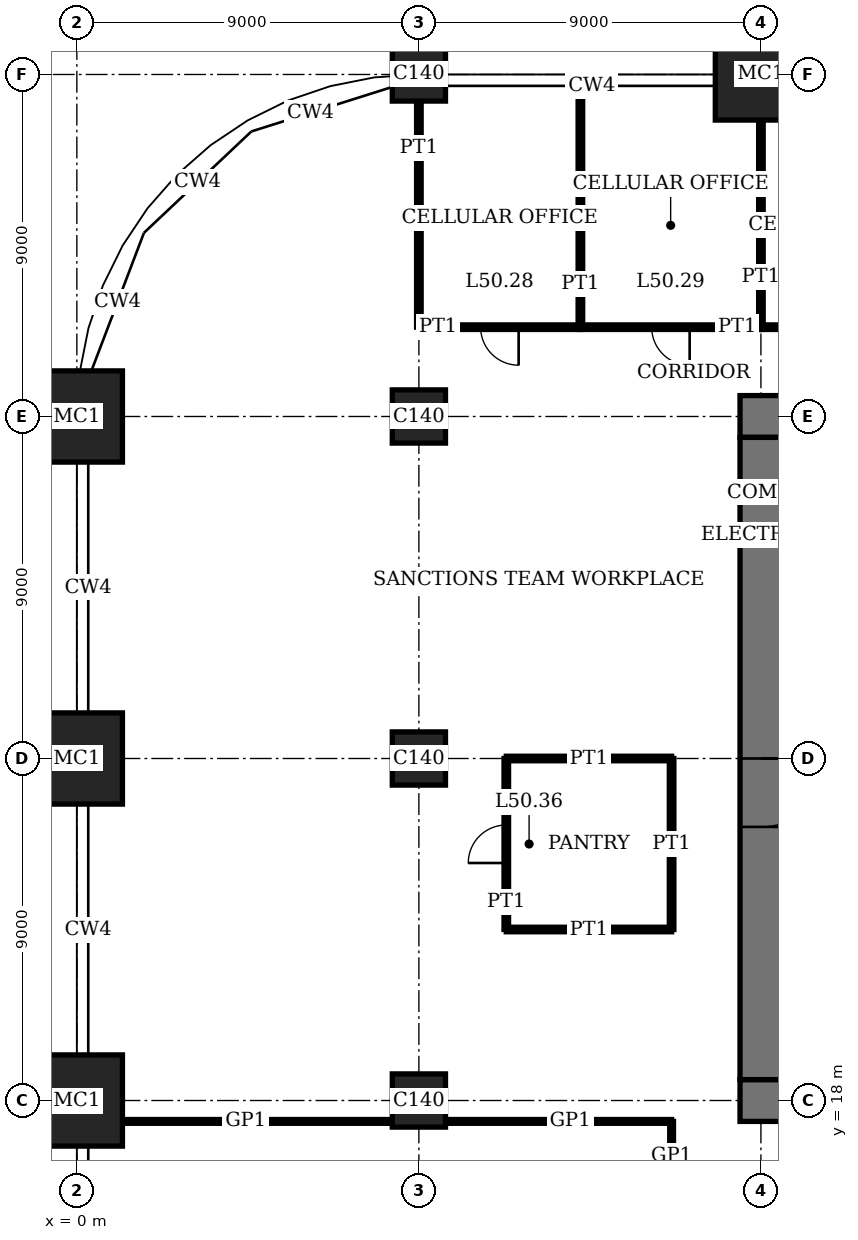
"""IFC4 building model, lengths in metres.
Left out: names, types, materials, properties, quantities, classifications, styles, units other than length and angle.
Written with IfcOpenShell. Run it as: python <this file> out.ifc"""

import sys

from ifc_helpers import new_model, si_unit, direction, frame, frame_2d, origin, origin_2d, place, context, subcontext, project, spatial, rectangle, extrude, element, fill, save


model = new_model("IFC4")
c1 = context("Model", 3, precision=1e-05, world=origin(), true_north=direction((0.0, 1.0)))
c2 = subcontext(c1, "Body", "Model", "MODEL_VIEW")
j1 = project(units=[si_unit("LENGTHUNIT", "METRE"), si_unit("PLANEANGLEUNIT", "RADIAN")], contexts=[c1])
p1 = place(None, origin())
s1 = spatial("IfcSite", under=j1, at=p1, CompositionType="ELEMENT")
p2 = place(p1, origin())
s2 = spatial("IfcBuilding", under=s1, at=p2, CompositionType="ELEMENT")
p3 = place(p2, frame((0.0, 0.0, 206.2)))
s3 = spatial("IfcBuildingStorey", under=s2, at=p3, CompositionType="ELEMENT", Elevation=206.2)
for number, where, z_axis, x_axis in (
    (1, (0.0, 18.0, 0.0), (0.0, 0.0, 1.0), (1.0, 0.0, 0.0)),
    (2, (0.0, 27.0, 0.0), (0.0, 0.0, 1.0), (1.0, 0.0, 0.0)),
    (3, (0.0, 36.0, 0.0), (0.0, 0.0, 1.0), (1.0, 0.0, 0.0)),
):
    element("IfcColumn", number, at=place(p3, frame(where, z_axis=z_axis, x_axis=x_axis)), inside=s3, PredefinedType="COLUMN", context=c2, shape_type="SweptSolid", body=[
        extrude(rectangle(XDim=2.4, YDim=2.4, at=origin_2d()), origin(), (0.0, 0.0, 1.0), 4.0),
    ])
for number, where, z_axis, x_axis in (
    (4, (9.0, 18.0, 0.0), (0.0, 0.0, 1.0), (1.0, 0.0, 0.0)),
    (5, (9.0, 27.0, 0.0), (0.0, 0.0, 1.0), (1.0, 0.0, 0.0)),
    (6, (9.0, 36.0, 0.0), (0.0, 0.0, 1.0), (1.0, 0.0, 0.0)),
    (7, (9.0, 45.0, 0.0), (0.0, 0.0, 1.0), (1.0, 0.0, 0.0)),
):
    element("IfcColumn", number, at=place(p3, frame(where, z_axis=z_axis, x_axis=x_axis)), inside=s3, PredefinedType="COLUMN", context=c2, shape_type="SweptSolid", body=[
        extrude(rectangle(XDim=1.4, YDim=1.4, at=origin_2d()), origin(), (0.0, 0.0, 1.0), 4.0),
    ])
p4 = place(p3, frame((18.0, 45.0, 0.0), z_axis=(0.0, 0.0, 1.0), x_axis=(1.0, 0.0, 0.0)))
e8 = element("IfcColumn", 8, at=p4, inside=s3, PredefinedType="COLUMN", context=c2, shape_type="SweptSolid", body=[
    extrude(rectangle(XDim=2.4, YDim=2.4, at=origin_2d()), origin(), (0.0, 0.0, 1.0), 4.0),
])
p5 = place(p3, frame((17.45, 18.0, 0.0), z_axis=(0.0, 0.0, 1.0), x_axis=(1.0, 0.0, 0.0)))
e9 = element("IfcWall", 9, at=p5, inside=s3, PredefinedType="SHEAR", context=c2, shape_type="SweptSolid", body=[
    extrude(rectangle(XDim=28.1, YDim=1.1, at=frame_2d((14.05, 0.0))), origin(), (0.0, 0.0, 1.0), 4.0),
])
p6 = place(p5, frame((11.55, 0.0, 0.0)))
e10 = element("IfcOpeningElement", 10, at=p6, cuts=e9, PredefinedType="OPENING", context=c2, shape_type="SweptSolid", body=[
    extrude(rectangle(XDim=1.0, YDim=2.4, at=frame_2d((0.5, 1.2))), frame((0.0, 0.56, 0.0), z_axis=(0.0, -1.0, 0.0), x_axis=(1.0, 0.0, 0.0)), (0.0, 0.0, 1.0), 1.12),
])
p7 = place(p5, frame((16.55, 0.0, 0.0)))
e11 = element("IfcOpeningElement", 11, at=p7, cuts=e9, PredefinedType="OPENING", context=c2, shape_type="SweptSolid", body=[
    extrude(rectangle(XDim=1.0, YDim=2.4, at=frame_2d((0.5, 1.2))), frame((0.0, 0.56, 0.0), z_axis=(0.0, -1.0, 0.0), x_axis=(1.0, 0.0, 0.0)), (0.0, 0.0, 1.0), 1.12),
])
p8 = place(p5, frame((20.0, 0.0, 0.0)))
e12 = element("IfcOpeningElement", 12, at=p8, cuts=e9, PredefinedType="OPENING", context=c2, shape_type="SweptSolid", body=[
    extrude(rectangle(XDim=1.1, YDim=2.4, at=frame_2d((0.55, 1.2))), frame((0.0, 0.56, 0.0), z_axis=(0.0, -1.0, 0.0), x_axis=(1.0, 0.0, 0.0)), (0.0, 0.0, 1.0), 1.12),
])
p9 = place(p5, frame((24.05, 0.0, 0.0)))
e13 = element("IfcOpeningElement", 13, at=p9, cuts=e9, PredefinedType="OPENING", context=c2, shape_type="SweptSolid", body=[
    extrude(rectangle(XDim=1.0, YDim=2.4, at=frame_2d((0.5, 1.2))), frame((0.0, 0.56, 0.0), z_axis=(0.0, -1.0, 0.0), x_axis=(1.0, 0.0, 0.0)), (0.0, 0.0, 1.0), 1.12),
])
p10 = place(p3, frame((45.55, 36.0, 0.0), z_axis=(0.0, 0.0, 1.0), x_axis=(-1.0, 0.0, 0.0)))
e14 = element("IfcWall", 14, at=p10, inside=s3, PredefinedType="SHEAR", context=c2, shape_type="SweptSolid", body=[
    extrude(rectangle(XDim=28.1, YDim=1.1, at=frame_2d((14.05, 0.0))), origin(), (0.0, 0.0, 1.0), 4.0),
])
p11 = place(p10, frame((11.55, 0.0, 0.0)))
e15 = element("IfcOpeningElement", 15, at=p11, cuts=e14, PredefinedType="OPENING", context=c2, shape_type="SweptSolid", body=[
    extrude(rectangle(XDim=1.0, YDim=2.4, at=frame_2d((0.5, 1.2))), frame((0.0, 0.56, 0.0), z_axis=(0.0, -1.0, 0.0), x_axis=(1.0, 0.0, 0.0)), (0.0, 0.0, 1.0), 1.12),
])
p12 = place(p10, frame((16.55, 0.0, 0.0)))
e16 = element("IfcOpeningElement", 16, at=p12, cuts=e14, PredefinedType="OPENING", context=c2, shape_type="SweptSolid", body=[
    extrude(rectangle(XDim=1.0, YDim=2.4, at=frame_2d((0.5, 1.2))), frame((0.0, 0.56, 0.0), z_axis=(0.0, -1.0, 0.0), x_axis=(1.0, 0.0, 0.0)), (0.0, 0.0, 1.0), 1.12),
])
p13 = place(p10, frame((20.0, 0.0, 0.0)))
e17 = element("IfcOpeningElement", 17, at=p13, cuts=e14, PredefinedType="OPENING", context=c2, shape_type="SweptSolid", body=[
    extrude(rectangle(XDim=1.1, YDim=2.4, at=frame_2d((0.55, 1.2))), frame((0.0, 0.56, 0.0), z_axis=(0.0, -1.0, 0.0), x_axis=(1.0, 0.0, 0.0)), (0.0, 0.0, 1.0), 1.12),
])
p14 = place(p10, frame((24.05, 0.0, 0.0)))
e18 = element("IfcOpeningElement", 18, at=p14, cuts=e14, PredefinedType="OPENING", context=c2, shape_type="SweptSolid", body=[
    extrude(rectangle(XDim=1.0, YDim=2.4, at=frame_2d((0.5, 1.2))), frame((0.0, 0.56, 0.0), z_axis=(0.0, -1.0, 0.0), x_axis=(1.0, 0.0, 0.0)), (0.0, 0.0, 1.0), 1.12),
])
p15 = place(p3, frame((18.0, 35.45, 0.0), z_axis=(0.0, 0.0, 1.0), x_axis=(0.0, -1.0, 0.0)))
e19 = element("IfcWall", 19, at=p15, inside=s3, PredefinedType="SHEAR", context=c2, shape_type="SweptSolid", body=[
    extrude(rectangle(XDim=16.9, YDim=1.1, at=frame_2d((8.45, 0.0))), origin(), (0.0, 0.0, 1.0), 4.0),
])
p16 = place(p15, frame((8.45, 0.0, 0.0)))
e20 = element("IfcOpeningElement", 20, at=p16, cuts=e19, PredefinedType="OPENING", context=c2, shape_type="SweptSolid", body=[
    extrude(rectangle(XDim=1.8, YDim=2.4, at=frame_2d((0.9, 1.2))), frame((0.0, 0.56, 0.0), z_axis=(0.0, -1.0, 0.0), x_axis=(1.0, 0.0, 0.0)), (0.0, 0.0, 1.0), 1.12),
])
p17 = place(p3, frame((1.2, 17.45, 0.0), z_axis=(0.0, 0.0, 1.0), x_axis=(1.0, 0.0, 0.0)))
e21 = element("IfcWall", 21, at=p17, inside=s3, PredefinedType="PARTITIONING", context=c2, shape_type="SweptSolid", body=[
    extrude(rectangle(XDim=7.1, YDim=0.1, at=frame_2d((3.55, 0.0))), origin(), (0.0, 0.0, 1.0), 3.75),
])
p18 = place(p3, frame((9.7, 17.45, 0.0), z_axis=(0.0, 0.0, 1.0), x_axis=(1.0, 0.0, 0.0)))
e22 = element("IfcWall", 22, at=p18, inside=s3, PredefinedType="PARTITIONING", context=c2, shape_type="SweptSolid", body=[
    extrude(rectangle(XDim=5.95, YDim=0.1, at=frame_2d((2.975, 0.0))), origin(), (0.0, 0.0, 1.0), 3.75),
])
p19 = place(p3, frame((11.3, 22.5, 0.0), z_axis=(0.0, 0.0, 1.0), x_axis=(1.0, 0.0, 0.0)))
e23 = element("IfcWall", 23, at=p19, inside=s3, PredefinedType="PARTITIONING", context=c2, shape_type="SweptSolid", body=[
    extrude(rectangle(XDim=4.35, YDim=0.12, at=frame_2d((2.175, 0.0))), origin(), (0.0, 0.0, 1.0), 3.1),
])
p20 = place(p3, frame((11.3, 27.0, 0.0), z_axis=(0.0, 0.0, 1.0), x_axis=(1.0, 0.0, 0.0)))
e24 = element("IfcWall", 24, at=p20, inside=s3, PredefinedType="PARTITIONING", context=c2, shape_type="SweptSolid", body=[
    extrude(rectangle(XDim=4.35, YDim=0.12, at=frame_2d((2.175, 0.0))), origin(), (0.0, 0.0, 1.0), 3.05),
])
p21 = place(p3, frame((9.0, 38.35, 0.0), z_axis=(0.0, 0.0, 1.0), x_axis=(1.0, 0.0, 0.0)))
e25 = element("IfcWall", 25, at=p21, inside=s3, PredefinedType="PARTITIONING", context=c2, shape_type="SweptSolid", body=[
    extrude(rectangle(XDim=4.25, YDim=0.12, at=frame_2d((2.125, 0.0))), origin(), (0.0, 0.0, 1.0), 3.75),
])
p22 = place(p21, frame((1.625, 0.0, 0.0)))
e26 = element("IfcOpeningElement", 26, at=p22, cuts=e25, PredefinedType="OPENING", context=c2, shape_type="SweptSolid", body=[
    extrude(rectangle(XDim=1.0, YDim=2.4, at=frame_2d((0.5, 1.2))), frame((0.0, 0.07, 0.0), z_axis=(0.0, -1.0, 0.0), x_axis=(1.0, 0.0, 0.0)), (0.0, 0.0, 1.0), 0.14),
])
p23 = place(p3, frame((13.25, 38.35, 0.0), z_axis=(0.0, 0.0, 1.0), x_axis=(1.0, 0.0, 0.0)))
e27 = element("IfcWall", 27, at=p23, inside=s3, PredefinedType="PARTITIONING", context=c2, shape_type="SweptSolid", body=[
    extrude(rectangle(XDim=4.75, YDim=0.12, at=frame_2d((2.375, 0.0))), origin(), (0.0, 0.0, 1.0), 3.75),
])
p24 = place(p23, frame((1.875, 0.0, 0.0)))
e28 = element("IfcOpeningElement", 28, at=p24, cuts=e27, PredefinedType="OPENING", context=c2, shape_type="SweptSolid", body=[
    extrude(rectangle(XDim=1.0, YDim=2.4, at=frame_2d((0.5, 1.2))), frame((0.0, 0.07, 0.0), z_axis=(0.0, -1.0, 0.0), x_axis=(1.0, 0.0, 0.0)), (0.0, 0.0, 1.0), 0.14),
])
p25 = place(p3, frame((18.0, 38.35, 0.0), z_axis=(0.0, 0.0, 1.0), x_axis=(1.0, 0.0, 0.0)))
e29 = element("IfcWall", 29, at=p25, inside=s3, PredefinedType="PARTITIONING", context=c2, shape_type="SweptSolid", body=[
    extrude(rectangle(XDim=4.5, YDim=0.12, at=frame_2d((2.25, 0.0))), origin(), (0.0, 0.0, 1.0), 3.75),
])
p26 = place(p25, frame((1.75, 0.0, 0.0)))
e30 = element("IfcOpeningElement", 30, at=p26, cuts=e29, PredefinedType="OPENING", context=c2, shape_type="SweptSolid", body=[
    extrude(rectangle(XDim=1.0, YDim=2.4, at=frame_2d((0.5, 1.2))), frame((0.0, 0.07, 0.0), z_axis=(0.0, -1.0, 0.0), x_axis=(1.0, 0.0, 0.0)), (0.0, 0.0, 1.0), 0.14),
])
p27 = place(p3, frame((9.0, 38.35, 0.0), z_axis=(0.0, 0.0, 1.0), x_axis=(0.0, 1.0, 0.0)))
e31 = element("IfcWall", 31, at=p27, inside=s3, PredefinedType="PARTITIONING", context=c2, shape_type="SweptSolid", body=[
    extrude(rectangle(XDim=5.95, YDim=0.12, at=frame_2d((2.975, 0.0))), origin(), (0.0, 0.0, 1.0), 3.05),
])
p28 = place(p3, frame((11.3, 22.5, 0.0), z_axis=(0.0, 0.0, 1.0), x_axis=(0.0, 1.0, 0.0)))
e32 = element("IfcWall", 32, at=p28, inside=s3, PredefinedType="PARTITIONING", context=c2, shape_type="SweptSolid", body=[
    extrude(rectangle(XDim=4.5, YDim=0.12, at=frame_2d((2.25, 0.0))), origin(), (0.0, 0.0, 1.0), 3.75),
])
p29 = place(p28, frame((1.75, 0.0, 0.0)))
e33 = element("IfcOpeningElement", 33, at=p29, cuts=e32, PredefinedType="OPENING", context=c2, shape_type="SweptSolid", body=[
    extrude(rectangle(XDim=1.0, YDim=2.4, at=frame_2d((0.5, 1.2))), frame((0.0, 0.07, 0.0), z_axis=(0.0, -1.0, 0.0), x_axis=(1.0, 0.0, 0.0)), (0.0, 0.0, 1.0), 0.14),
])
p30 = place(p3, frame((13.25, 38.35, 0.0), z_axis=(0.0, 0.0, 1.0), x_axis=(0.0, 1.0, 0.0)))
e34 = element("IfcWall", 34, at=p30, inside=s3, PredefinedType="PARTITIONING", context=c2, shape_type="SweptSolid", body=[
    extrude(rectangle(XDim=6.34, YDim=0.12, at=frame_2d((3.17, 0.0))), origin(), (0.0, 0.0, 1.0), 3.75),
])
p31 = place(p3, frame((15.65, 22.5, 0.0), z_axis=(0.0, 0.0, 1.0), x_axis=(0.0, 1.0, 0.0)))
e35 = element("IfcWall", 35, at=p31, inside=s3, PredefinedType="PARTITIONING", context=c2, shape_type="SweptSolid", body=[
    extrude(rectangle(XDim=4.5, YDim=0.12, at=frame_2d((2.25, 0.0))), origin(), (0.0, 0.0, 1.0), 3.75),
])
p32 = place(p3, frame((15.65, 15.65, 0.0), z_axis=(0.0, 0.0, 1.0), x_axis=(0.0, 1.0, 0.0)))
e36 = element("IfcWall", 36, at=p32, inside=s3, PredefinedType="PARTITIONING", context=c2, shape_type="SweptSolid", body=[
    extrude(rectangle(XDim=1.8, YDim=0.1, at=frame_2d((0.9, 0.0))), origin(), (0.0, 0.0, 1.0), 3.75),
])
p33 = place(p3, frame((18.0, 38.35, 0.0), z_axis=(0.0, 0.0, 1.0), x_axis=(0.0, 1.0, 0.0)))
e37 = element("IfcWall", 37, at=p33, inside=s3, PredefinedType="PARTITIONING", context=c2, shape_type="SweptSolid", body=[
    extrude(rectangle(XDim=5.45, YDim=0.12, at=frame_2d((2.725, 0.0))), origin(), (0.0, 0.0, 1.0), 3.05),
])
p34 = place(p16, origin())
e38 = element("IfcDoor", 38, at=p34, inside=s3, OperationType="DOUBLE_DOOR_DOUBLE_SWING", PredefinedType="DOOR", context=c2, shape_type="SweptSolid", body=[
    extrude(rectangle(XDim=1.8, YDim=2.4, at=frame_2d((0.9, 1.2))), frame((0.0, 0.03, 0.0), z_axis=(0.0, -1.0, 0.0), x_axis=(1.0, 0.0, 0.0)), (0.0, 0.0, 1.0), 0.06),
    extrude(rectangle(XDim=0.04, YDim=2.4, at=frame_2d((0.02, 1.2))), frame((0.0, 0.55, 0.0), z_axis=(0.0, -1.0, 0.0), x_axis=(1.0, 0.0, 0.0)), (0.0, 0.0, 1.0), 1.1),
    extrude(rectangle(XDim=0.04, YDim=2.4, at=frame_2d((1.78, 1.2))), frame((0.0, 0.55, 0.0), z_axis=(0.0, -1.0, 0.0), x_axis=(1.0, 0.0, 0.0)), (0.0, 0.0, 1.0), 1.1),
    extrude(rectangle(XDim=1.8, YDim=0.04, at=frame_2d((0.9, 2.38))), frame((0.0, 0.55, 0.0), z_axis=(0.0, -1.0, 0.0), x_axis=(1.0, 0.0, 0.0)), (0.0, 0.0, 1.0), 1.1),
])
fill(e20, e38)
p35 = place(p22, origin())
e39 = element("IfcDoor", 39, at=p35, inside=s3, OperationType="SINGLE_SWING_RIGHT", PredefinedType="DOOR", context=c2, shape_type="SweptSolid", body=[
    extrude(rectangle(XDim=1.0, YDim=2.4, at=frame_2d((0.5, 1.2))), frame((0.0, 0.025, 0.0), z_axis=(0.0, -1.0, 0.0), x_axis=(1.0, 0.0, 0.0)), (0.0, 0.0, 1.0), 0.05),
])
fill(e26, e39)
p36 = place(p24, origin())
e40 = element("IfcDoor", 40, at=p36, inside=s3, OperationType="SINGLE_SWING_RIGHT", PredefinedType="DOOR", context=c2, shape_type="SweptSolid", body=[
    extrude(rectangle(XDim=1.0, YDim=2.4, at=frame_2d((0.5, 1.2))), frame((0.0, 0.025, 0.0), z_axis=(0.0, -1.0, 0.0), x_axis=(1.0, 0.0, 0.0)), (0.0, 0.0, 1.0), 0.05),
])
fill(e28, e40)
p37 = place(p29, origin())
e41 = element("IfcDoor", 41, at=p37, inside=s3, OperationType="SINGLE_SWING_RIGHT", PredefinedType="DOOR", context=c2, shape_type="SweptSolid", body=[
    extrude(rectangle(XDim=1.0, YDim=2.4, at=frame_2d((0.5, 1.2))), frame((0.0, 0.025, 0.0), z_axis=(0.0, -1.0, 0.0), x_axis=(1.0, 0.0, 0.0)), (0.0, 0.0, 1.0), 0.05),
])
fill(e33, e41)
save(model, sys.argv[1])
